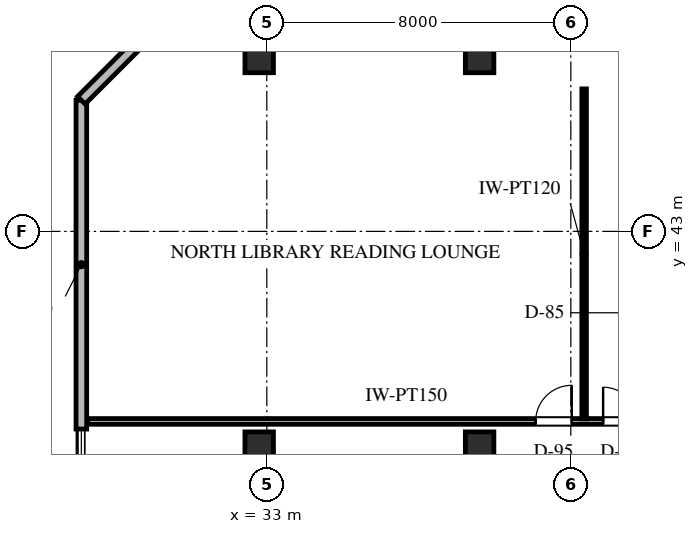
"""IFC4 building model, lengths in metres.
Left out: names, types, materials, properties, quantities, classifications, styles, units other than length and angle.
Written with IfcOpenShell. Run it as: python <this file> out.ifc"""

import sys

from ifc_helpers import new_model, si_unit, direction, frame, frame_2d, origin, origin_2d, place, context, subcontext, project, spatial, rectangle, extrude, element, fill, save


model = new_model("IFC4")
c1 = context("Model", 3, precision=1e-05, world=origin(), true_north=direction((0.0, 1.0)))
c2 = subcontext(c1, "Body", "Model", "MODEL_VIEW")
j1 = project(units=[si_unit("LENGTHUNIT", "METRE"), si_unit("PLANEANGLEUNIT", "RADIAN")], contexts=[c1])
p1 = place(None, origin())
s1 = spatial("IfcSite", under=j1, at=p1, CompositionType="ELEMENT")
p2 = place(p1, origin())
s2 = spatial("IfcBuilding", under=s1, at=p2, CompositionType="ELEMENT")
p3 = place(p2, frame((0.0, 0.0, 270.6)))
s3 = spatial("IfcBuildingStorey", under=s2, at=p3, CompositionType="ELEMENT", Elevation=270.6)
for number, where, z_axis, x_axis in (
    (1, (38.6, 37.35, 0.0), (0.0, 0.0, 1.0), (1.0, 0.0, 0.0)),
    (2, (38.6, 47.55, 0.0), (0.0, 0.0, 1.0), (1.0, 0.0, 0.0)),
    (3, (32.8, 37.35, 0.0), (0.0, 0.0, 1.0), (1.0, 0.0, 0.0)),
    (4, (32.8, 47.55, 0.0), (0.0, 0.0, 1.0), (1.0, 0.0, 0.0)),
):
    element("IfcColumn", number, at=place(p3, frame(where, z_axis=z_axis, x_axis=x_axis)), inside=s3, PredefinedType="COLUMN", context=c2, shape_type="SweptSolid", body=[
        extrude(rectangle(XDim=0.75, YDim=0.75, at=origin_2d()), origin(), (0.0, 0.0, 1.0), 3.6),
    ])
p4 = place(p3, frame((28.12, 37.8, 0.0), z_axis=(0.0, 0.0, 1.0), x_axis=(0.0, 1.0, 0.0)))
e5 = element("IfcWall", 5, at=p4, inside=s3, PredefinedType="STANDARD", context=c2, shape_type="SweptSolid", body=[
    extrude(rectangle(XDim=8.65, YDim=0.28, at=frame_2d((4.325, 0.0))), origin(), (0.0, 0.0, 1.0), 3.36),
])
p5 = place(p3, frame((28.12, 46.45, 0.0), z_axis=(0.0, 0.0, 1.0), x_axis=(0.707106781187, 0.707106781187, 0.0)))
e6 = element("IfcWall", 6, at=p5, inside=s3, PredefinedType="STANDARD", context=c2, shape_type="SweptSolid", body=[
    extrude(rectangle(XDim=2.729, YDim=0.28, at=frame_2d((1.365, 0.0))), origin(), (0.0, 0.0, 1.0), 3.36),
])
p6 = place(p3, frame((28.285, 38.0, 0.0), z_axis=(0.0, 0.0, 1.0), x_axis=(1.0, 0.0, 0.0)))
e7 = element("IfcWall", 7, at=p6, inside=s3, PredefinedType="PARTITIONING", context=c2, shape_type="SweptSolid", body=[
    extrude(rectangle(XDim=16.765, YDim=0.15, at=frame_2d((8.383, 0.0))), origin(), (0.0, 0.0, 1.0), 2.664),
])
p7 = place(p6, frame((11.79, 0.0, 0.0)))
e8 = element("IfcOpeningElement", 8, at=p7, cuts=e7, PredefinedType="OPENING", context=c2, shape_type="SweptSolid", body=[
    extrude(rectangle(XDim=0.95, YDim=2.15, at=frame_2d((0.475, 1.075))), frame((0.0, 0.085, 0.0), z_axis=(0.0, -1.0, 0.0), x_axis=(1.0, 0.0, 0.0)), (0.0, 0.0, 1.0), 0.17),
])
p8 = place(p6, frame((13.565, 0.0, 0.0)))
e9 = element("IfcOpeningElement", 9, at=p8, cuts=e7, PredefinedType="OPENING", context=c2, shape_type="SweptSolid", body=[
    extrude(rectangle(XDim=0.9, YDim=2.1, at=frame_2d((0.45, 1.05))), frame((0.0, 0.085, 0.0), z_axis=(0.0, -1.0, 0.0), x_axis=(1.0, 0.0, 0.0)), (0.0, 0.0, 1.0), 0.17),
])
p9 = place(p3, frame((41.35, 38.068, 0.0), z_axis=(0.0, 0.0, 1.0), x_axis=(0.0, 1.0, 0.0)))
e10 = element("IfcWall", 10, at=p9, inside=s3, PredefinedType="PARTITIONING", context=c2, shape_type="SweptSolid", body=[
    extrude(rectangle(XDim=8.682, YDim=0.12, at=frame_2d((4.341, 0.0))), origin(), (0.0, 0.0, 1.0), 3.36),
])
p10 = place(p7, origin())
e11 = element("IfcDoor", 11, at=p10, inside=s3, OperationType="SINGLE_SWING_RIGHT", PredefinedType="DOOR", context=c2, shape_type="SweptSolid", body=[
    extrude(rectangle(XDim=0.95, YDim=2.15, at=frame_2d((0.475, 1.075))), frame((0.0, 0.025, 0.0), z_axis=(0.0, -1.0, 0.0), x_axis=(1.0, 0.0, 0.0)), (0.0, 0.0, 1.0), 0.05),
])
fill(e8, e11)
p11 = place(p8, origin())
e12 = element("IfcDoor", 12, at=p11, inside=s3, OperationType="SINGLE_SWING_LEFT", PredefinedType="DOOR", context=c2, shape_type="SweptSolid", body=[
    extrude(rectangle(XDim=0.9, YDim=2.1, at=frame_2d((0.45, 1.05))), frame((0.0, 0.025, 0.0), z_axis=(0.0, -1.0, 0.0), x_axis=(1.0, 0.0, 0.0)), (0.0, 0.0, 1.0), 0.05),
])
fill(e9, e12)
save(model, sys.argv[1])
